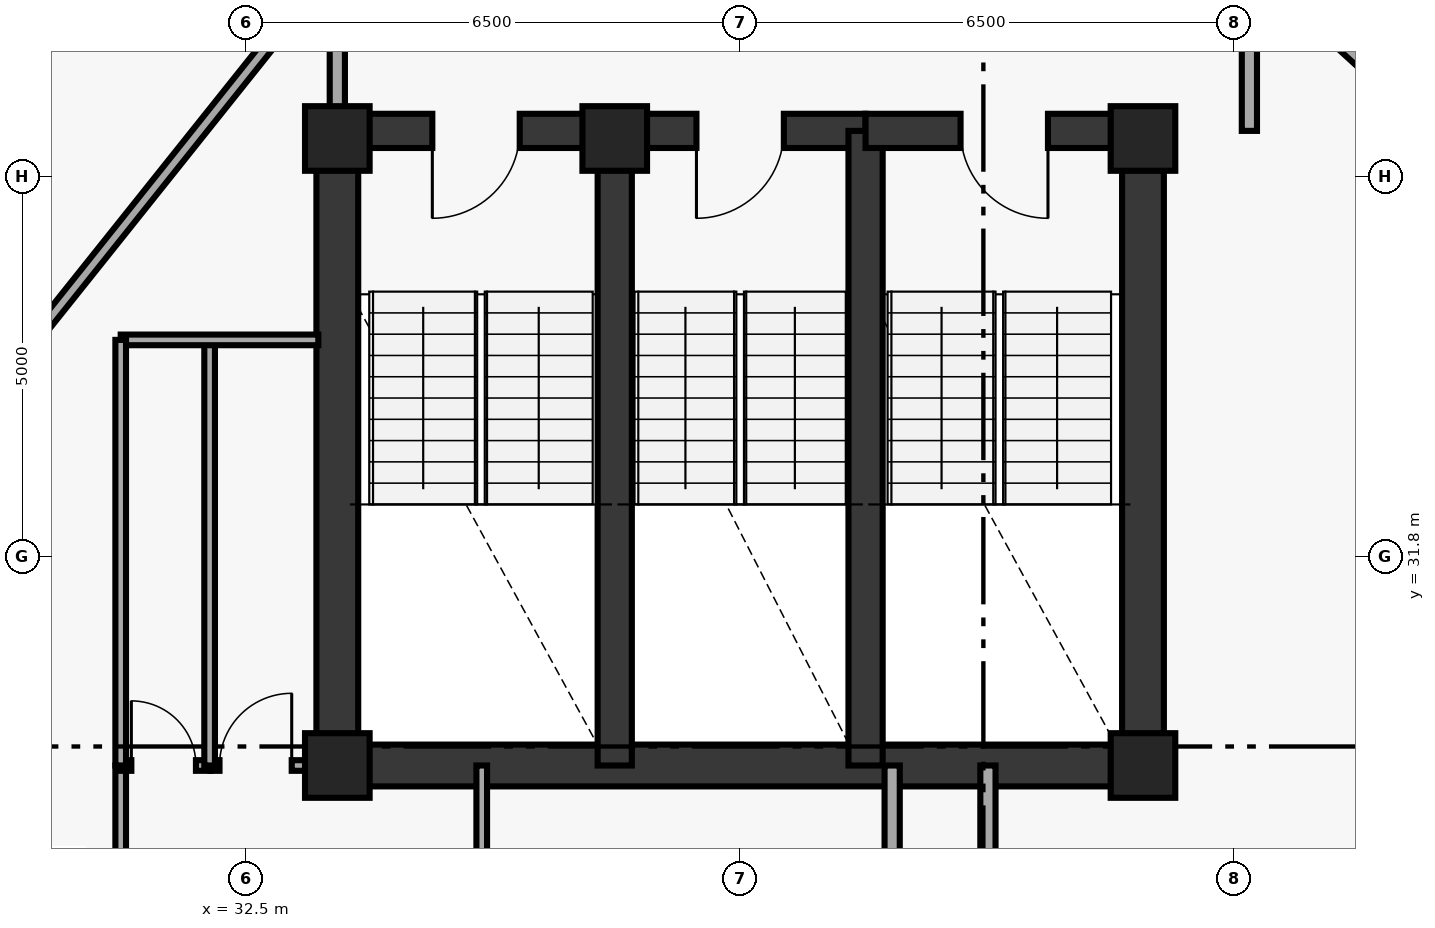
"""IFC4 building model, lengths in metres.
Left out: names, types, materials, properties, quantities, classifications, styles, units other than length and angle.
Written with IfcOpenShell. Run it as: python <this file> out.ifc"""

import sys

from ifc_helpers import new_model, si_unit, direction, frame, frame_2d, origin, origin_2d, place, context, subcontext, project, spatial, rectangle, extrude, element, fill, save


model = new_model("IFC4")
c1 = context("Model", 3, precision=1e-05, world=origin(), true_north=direction((0.0, 1.0)))
c2 = subcontext(c1, "Body", "Model", "MODEL_VIEW")
j1 = project(units=[si_unit("LENGTHUNIT", "METRE"), si_unit("PLANEANGLEUNIT", "RADIAN")], contexts=[c1])
p1 = place(None, origin())
s1 = spatial("IfcSite", under=j1, at=p1, CompositionType="ELEMENT")
p2 = place(p1, origin())
s2 = spatial("IfcBuilding", under=s1, at=p2, CompositionType="ELEMENT")
p3 = place(p2, frame((0.0, 0.0, 208.15)))
s3 = spatial("IfcBuildingStorey", under=s2, at=p3, CompositionType="ELEMENT", Elevation=208.15)
for number, where, z_axis, x_axis in (
    (1, (44.3, 29.05, 0.0), (0.0, 0.0, 1.0), (1.0, 0.0, 0.0)),
    (2, (44.3, 37.3, 0.0), (0.0, 0.0, 1.0), (1.0, 0.0, 0.0)),
    (3, (37.35, 37.3, 0.0), (0.0, 0.0, 1.0), (1.0, 0.0, 0.0)),
    (4, (33.7, 37.3, 0.0), (0.0, 0.0, 1.0), (1.0, 0.0, 0.0)),
    (5, (33.7, 29.05, 0.0), (0.0, 0.0, 1.0), (1.0, 0.0, 0.0)),
):
    element("IfcColumn", number, at=place(p3, frame(where, z_axis=z_axis, x_axis=x_axis)), inside=s3, PredefinedType="PILASTER", context=c2, shape_type="SweptSolid", body=[
        extrude(rectangle(XDim=0.85, YDim=0.85, at=origin_2d()), origin(), (0.0, 0.0, 1.0), 3.41),
    ])
for number, where, z_axis, x_axis in (
    (6, (33.7, 29.05, 0.0), (0.0, 0.0, 1.0), (0.0, 1.0, 0.0)),
    (7, (44.3, 29.05, 0.0), (0.0, 0.0, 1.0), (0.0, 1.0, 0.0)),
):
    element("IfcWall", number, at=place(p3, frame(where, z_axis=z_axis, x_axis=x_axis)), inside=s3, PredefinedType="SHEAR", context=c2, shape_type="SweptSolid", body=[
        extrude(rectangle(XDim=8.35, YDim=0.55, at=frame_2d((4.175, 0.0))), origin(), (0.0, 0.0, 1.0), 3.41),
    ])
p4 = place(p3, frame((33.7, 29.05, 0.0), z_axis=(0.0, 0.0, 1.0), x_axis=(1.0, 0.0, 0.0)))
e8 = element("IfcWall", 8, at=p4, inside=s3, PredefinedType="SHEAR", context=c2, shape_type="SweptSolid", body=[
    extrude(rectangle(XDim=10.6, YDim=0.55, at=frame_2d((5.3, 0.0))), origin(), (0.0, 0.0, 1.0), 3.41),
])
p5 = place(p3, frame((37.35, 37.4, 0.0), z_axis=(0.0, 0.0, 1.0), x_axis=(-1.0, 0.0, 0.0)))
e9 = element("IfcWall", 9, at=p5, inside=s3, PredefinedType="SHEAR", context=c2, shape_type="SweptSolid", body=[
    extrude(rectangle(XDim=3.65, YDim=0.45, at=frame_2d((1.825, 0.0))), origin(), (0.0, 0.0, 1.0), 3.41),
])
p6 = place(p5, frame((1.25, 0.0, 0.0)))
e10 = element("IfcOpeningElement", 10, at=p6, cuts=e9, PredefinedType="OPENING", context=c2, shape_type="SweptSolid", body=[
    extrude(rectangle(XDim=1.15, YDim=2.15, at=frame_2d((0.575, 1.075))), frame((0.0, 0.235, 0.0), z_axis=(0.0, -1.0, 0.0), x_axis=(1.0, 0.0, 0.0)), (0.0, 0.0, 1.0), 0.47),
])
p7 = place(p3, frame((37.35, 29.05, 0.0), z_axis=(0.0, 0.0, 1.0), x_axis=(0.0, 1.0, 0.0)))
e11 = element("IfcWall", 11, at=p7, inside=s3, PredefinedType="SHEAR", context=c2, shape_type="SweptSolid", body=[
    extrude(rectangle(XDim=8.35, YDim=0.45, at=frame_2d((4.175, 0.0))), origin(), (0.0, 0.0, 1.0), 3.41),
])
p8 = place(p3, frame((40.65, 37.4, 0.0), z_axis=(0.0, 0.0, 1.0), x_axis=(-1.0, 0.0, 0.0)))
e12 = element("IfcWall", 12, at=p8, inside=s3, PredefinedType="SHEAR", context=c2, shape_type="SweptSolid", body=[
    extrude(rectangle(XDim=3.3, YDim=0.45, at=frame_2d((1.65, 0.0))), origin(), (0.0, 0.0, 1.0), 3.41),
])
p9 = place(p8, frame((1.075, 0.0, 0.0)))
e13 = element("IfcOpeningElement", 13, at=p9, cuts=e12, PredefinedType="OPENING", context=c2, shape_type="SweptSolid", body=[
    extrude(rectangle(XDim=1.15, YDim=2.15, at=frame_2d((0.575, 1.075))), frame((0.0, 0.235, 0.0), z_axis=(0.0, -1.0, 0.0), x_axis=(1.0, 0.0, 0.0)), (0.0, 0.0, 1.0), 0.47),
])
p10 = place(p3, frame((40.65, 29.05, 0.0), z_axis=(0.0, 0.0, 1.0), x_axis=(0.0, 1.0, 0.0)))
e14 = element("IfcWall", 14, at=p10, inside=s3, PredefinedType="SHEAR", context=c2, shape_type="SweptSolid", body=[
    extrude(rectangle(XDim=8.35, YDim=0.45, at=frame_2d((4.175, 0.0))), origin(), (0.0, 0.0, 1.0), 3.41),
])
p11 = place(p3, frame((44.3, 37.4, 0.0), z_axis=(0.0, 0.0, 1.0), x_axis=(-1.0, 0.0, 0.0)))
e15 = element("IfcWall", 15, at=p11, inside=s3, PredefinedType="SHEAR", context=c2, shape_type="SweptSolid", body=[
    extrude(rectangle(XDim=3.65, YDim=0.45, at=frame_2d((1.825, 0.0))), origin(), (0.0, 0.0, 1.0), 3.41),
])
p12 = place(p11, frame((1.25, 0.0, 0.0)))
e16 = element("IfcOpeningElement", 16, at=p12, cuts=e15, PredefinedType="OPENING", context=c2, shape_type="SweptSolid", body=[
    extrude(rectangle(XDim=1.15, YDim=2.15, at=frame_2d((0.575, 1.075))), frame((0.0, 0.235, 0.0), z_axis=(0.0, -1.0, 0.0), x_axis=(1.0, 0.0, 0.0)), (0.0, 0.0, 1.0), 0.47),
])
for number, where, z_axis, x_axis in (
    (17, (33.7, 37.4, 0.0), (0.0, 0.0, 1.0), (0.0, 1.0, 0.0)),
    (18, (45.7, 37.4, 0.0), (0.0, 0.0, 1.0), (0.0, 1.0, 0.0)),
):
    element("IfcWall", number, at=place(p3, frame(where, z_axis=z_axis, x_axis=x_axis)), inside=s3, PredefinedType="SOLIDWALL", context=c2, shape_type="SweptSolid", body=[
        extrude(rectangle(XDim=1.88, YDim=0.2, at=frame_2d((0.94, 0.0))), origin(), (0.0, 0.0, 1.0), 3.41),
    ])
p13 = place(p3, frame((35.6, 27.28, 0.0), z_axis=(0.0, 0.0, 1.0), x_axis=(0.0, 1.0, 0.0)))
e19 = element("IfcWall", 19, at=p13, inside=s3, PredefinedType="PARTITIONING", context=c2, shape_type="SweptSolid", body=[
    extrude(rectangle(XDim=1.77, YDim=0.14, at=frame_2d((0.885, 0.0))), origin(), (0.0, 0.0, 1.0), 3.41),
])
for number, where, z_axis, x_axis in (
    (20, (41.0, 27.28, 0.0), (0.0, 0.0, 1.0), (0.0, 1.0, 0.0)),
    (21, (42.26, 27.28, 0.0), (0.0, 0.0, 1.0), (0.0, 1.0, 0.0)),
):
    element("IfcWall", number, at=place(p3, frame(where, z_axis=z_axis, x_axis=x_axis)), inside=s3, PredefinedType="SOLIDWALL", context=c2, shape_type="SweptSolid", body=[
        extrude(rectangle(XDim=1.77, YDim=0.2, at=frame_2d((0.885, 0.0))), origin(), (0.0, 0.0, 1.0), 3.41),
    ])
p14 = place(p3, frame((30.85, 27.24, 0.0), z_axis=(0.0, 0.0, 1.0), x_axis=(0.0, 1.0, 0.0)))
e22 = element("IfcWall", 22, at=p14, inside=s3, PredefinedType="PARTITIONING", context=c2, shape_type="SweptSolid", body=[
    extrude(rectangle(XDim=1.81, YDim=0.14, at=frame_2d((0.905, 0.0))), origin(), (0.0, 0.0, 1.0), 3.41),
])
p15 = place(p3, frame((30.85, 29.05, 0.0), z_axis=(0.0, 0.0, 1.0), x_axis=(1.0, 0.0, 0.0)))
e23 = element("IfcWall", 23, at=p15, inside=s3, PredefinedType="PARTITIONING", context=c2, shape_type="SweptSolid", body=[
    extrude(rectangle(XDim=1.18, YDim=0.14, at=frame_2d((0.59, 0.0))), origin(), (0.0, 0.0, 1.0), 3.41),
])
p16 = place(p15, frame((0.14, 0.0, 0.0)))
e24 = element("IfcOpeningElement", 24, at=p16, cuts=e23, PredefinedType="OPENING", context=c2, shape_type="SweptSolid", body=[
    extrude(rectangle(XDim=0.85, YDim=2.1, at=frame_2d((0.425, 1.05))), frame((0.0, 0.08, 0.0), z_axis=(0.0, -1.0, 0.0), x_axis=(1.0, 0.0, 0.0)), (0.0, 0.0, 1.0), 0.16),
])
p17 = place(p3, frame((32.03, 29.05, 0.0), z_axis=(0.0, 0.0, 1.0), x_axis=(1.0, 0.0, 0.0)))
e25 = element("IfcWall", 25, at=p17, inside=s3, PredefinedType="PARTITIONING", context=c2, shape_type="SweptSolid", body=[
    extrude(rectangle(XDim=1.25, YDim=0.14, at=frame_2d((0.625, 0.0))), origin(), (0.0, 0.0, 1.0), 2.55),
])
p18 = place(p17, frame((0.12, 0.0, 0.0)))
e26 = element("IfcOpeningElement", 26, at=p18, cuts=e25, PredefinedType="OPENING", context=c2, shape_type="SweptSolid", body=[
    extrude(rectangle(XDim=0.95, YDim=2.1, at=frame_2d((0.475, 1.05))), frame((0.0, 0.08, 0.0), z_axis=(0.0, -1.0, 0.0), x_axis=(1.0, 0.0, 0.0)), (0.0, 0.0, 1.0), 0.16),
])
p19 = place(p3, frame((32.02, 29.05, 0.0), z_axis=(0.0, 0.0, 1.0), x_axis=(0.0, 1.0, 0.0)))
e27 = element("IfcWall", 27, at=p19, inside=s3, PredefinedType="PARTITIONING", context=c2, shape_type="SweptSolid", body=[
    extrude(rectangle(XDim=5.6, YDim=0.14, at=frame_2d((2.8, 0.0))), origin(), (0.0, 0.0, 1.0), 3.41),
])
p20 = place(p3, frame((30.85, 34.65, 0.0), z_axis=(0.0, 0.0, 1.0), x_axis=(1.0, 0.0, 0.0)))
e28 = element("IfcWall", 28, at=p20, inside=s3, PredefinedType="PARTITIONING", context=c2, shape_type="SweptSolid", body=[
    extrude(rectangle(XDim=2.6, YDim=0.14, at=frame_2d((1.3, 0.0))), origin(), (0.0, 0.0, 1.0), 3.41),
])
p21 = place(p3, frame((30.85, 29.05, 0.0), z_axis=(0.0, 0.0, 1.0), x_axis=(0.0, 1.0, 0.0)))
e29 = element("IfcWall", 29, at=p21, inside=s3, PredefinedType="PARTITIONING", context=c2, shape_type="SweptSolid", body=[
    extrude(rectangle(XDim=5.6, YDim=0.14, at=frame_2d((2.8, 0.0))), origin(), (0.0, 0.0, 1.0), 3.41),
])
p22 = place(p3, frame((45.385, 39.938, 0.0), z_axis=(0.0, 0.0, 1.0), x_axis=(0.739059723008, -0.673639908132, 0.0)))
e30 = element("IfcWall", 30, at=p22, inside=s3, PredefinedType="PARTITIONING", context=c2, shape_type="SweptSolid", body=[
    extrude(rectangle(XDim=3.579, YDim=0.16, at=frame_2d((1.79, 0.0))), origin(), (0.0, 0.0, 1.0), 3.41),
])
p23 = place(p22, frame((2.379, 0.0, 0.0)))
e31 = element("IfcOpeningElement", 31, at=p23, cuts=e30, PredefinedType="OPENING", context=c2, shape_type="SweptSolid", body=[
    extrude(rectangle(XDim=1.0, YDim=2.15, at=frame_2d((0.5, 1.075))), frame((0.0, 0.09, 0.0), z_axis=(0.0, -1.0, 0.0), x_axis=(1.0, 0.0, 0.0)), (0.0, 0.0, 1.0), 0.18),
])
p24 = place(p3, frame((33.3, 39.167, 0.0), z_axis=(0.0, 0.0, 1.0), x_axis=(-0.623915746766, -0.781491612839, 0.0)))
e32 = element("IfcWall", 32, at=p24, inside=s3, PredefinedType="PARTITIONING", context=c2, shape_type="SweptSolid", body=[
    extrude(rectangle(XDim=6.688, YDim=0.16, at=frame_2d((3.344, 0.0))), origin(), (0.0, 0.0, 1.0), 3.41),
])
p25 = place(p3, frame((28.959, 38.078, 0.0), z_axis=(0.0, 0.0, 1.0), x_axis=(0.757424973134, 0.652922208286, 0.0)))
e33 = element("IfcWall", 33, at=p25, inside=s3, PredefinedType="PARTITIONING", context=c2, shape_type="SweptSolid", body=[
    extrude(rectangle(XDim=3.883, YDim=0.125, at=frame_2d((1.941, 0.0))), origin(), (0.0, 0.0, 1.0), 3.41),
])
p26 = place(p25, frame((1.491, 0.0, 0.0)))
e34 = element("IfcOpeningElement", 34, at=p26, cuts=e33, PredefinedType="OPENING", context=c2, shape_type="SweptSolid", body=[
    extrude(rectangle(XDim=0.9, YDim=2.1, at=frame_2d((0.45, 1.05))), frame((0.0, 0.073, 0.0), z_axis=(0.0, -1.0, 0.0), x_axis=(1.0, 0.0, 0.0)), (0.0, 0.0, 1.0), 0.145),
])
p27 = place(p6, origin())
e35 = element("IfcDoor", 35, at=p27, inside=s3, OperationType="SINGLE_SWING_RIGHT", PredefinedType="DOOR", context=c2, shape_type="SweptSolid", body=[
    extrude(rectangle(XDim=1.15, YDim=2.15, at=frame_2d((0.575, 1.075))), frame((0.0, 0.025, 0.0), z_axis=(0.0, -1.0, 0.0), x_axis=(1.0, 0.0, 0.0)), (0.0, 0.0, 1.0), 0.05),
])
fill(e10, e35)
p28 = place(p9, origin())
e36 = element("IfcDoor", 36, at=p28, inside=s3, OperationType="SINGLE_SWING_RIGHT", PredefinedType="DOOR", context=c2, shape_type="SweptSolid", body=[
    extrude(rectangle(XDim=1.15, YDim=2.15, at=frame_2d((0.575, 1.075))), frame((0.0, 0.025, 0.0), z_axis=(0.0, -1.0, 0.0), x_axis=(1.0, 0.0, 0.0)), (0.0, 0.0, 1.0), 0.05),
])
fill(e13, e36)
p29 = place(p12, origin())
e37 = element("IfcDoor", 37, at=p29, inside=s3, OperationType="SINGLE_SWING_LEFT", PredefinedType="DOOR", context=c2, shape_type="SweptSolid", body=[
    extrude(rectangle(XDim=1.15, YDim=2.15, at=frame_2d((0.575, 1.075))), frame((0.0, 0.025, 0.0), z_axis=(0.0, -1.0, 0.0), x_axis=(1.0, 0.0, 0.0)), (0.0, 0.0, 1.0), 0.05),
])
fill(e16, e37)
p30 = place(p16, origin())
e38 = element("IfcDoor", 38, at=p30, inside=s3, OperationType="SINGLE_SWING_LEFT", PredefinedType="DOOR", context=c2, shape_type="SweptSolid", body=[
    extrude(rectangle(XDim=0.85, YDim=2.1, at=frame_2d((0.425, 1.05))), frame((0.0, 0.025, 0.0), z_axis=(0.0, -1.0, 0.0), x_axis=(1.0, 0.0, 0.0)), (0.0, 0.0, 1.0), 0.05),
])
fill(e24, e38)
p31 = place(p18, origin())
e39 = element("IfcDoor", 39, at=p31, inside=s3, OperationType="SINGLE_SWING_RIGHT", PredefinedType="DOOR", context=c2, shape_type="SweptSolid", body=[
    extrude(rectangle(XDim=0.95, YDim=2.1, at=frame_2d((0.475, 1.05))), frame((0.0, 0.025, 0.0), z_axis=(0.0, -1.0, 0.0), x_axis=(1.0, 0.0, 0.0)), (0.0, 0.0, 1.0), 0.05),
])
fill(e26, e39)
save(model, sys.argv[1])
